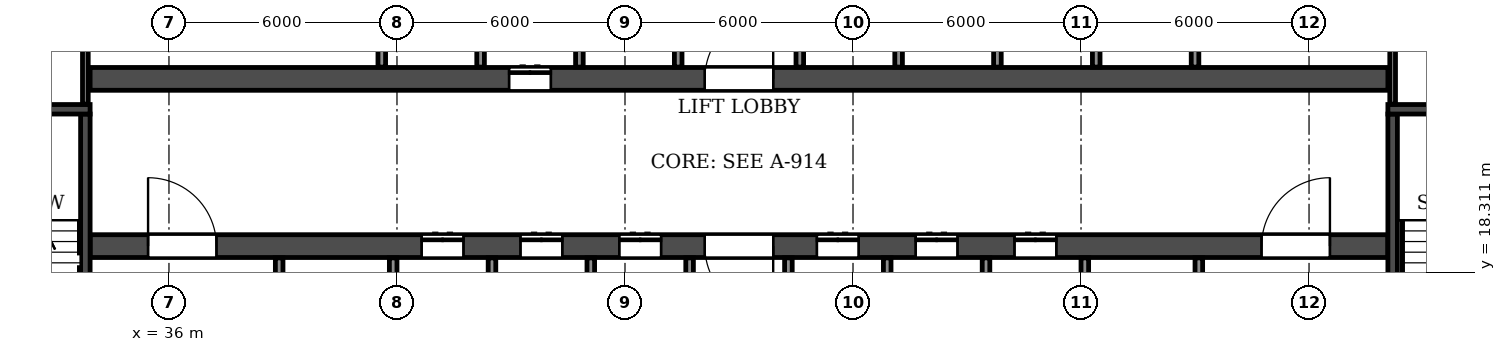
"""IFC4 building model, lengths in metres.
Left out: names, types, materials, properties, quantities, classifications, styles, units other than length and angle.
Written with IfcOpenShell. Run it as: python <this file> out.ifc"""

import sys

from ifc_helpers import new_model, si_unit, direction, frame, frame_2d, origin, place, context, subcontext, project, spatial, rectangle, extrude, element, fill, save


model = new_model("IFC4")
c1 = context("Model", 3, precision=1e-05, world=origin(), true_north=direction((0.0, 1.0)))
c2 = subcontext(c1, "Body", "Model", "MODEL_VIEW")
j1 = project(units=[si_unit("LENGTHUNIT", "METRE"), si_unit("PLANEANGLEUNIT", "RADIAN")], contexts=[c1])
p1 = place(None, origin())
s1 = spatial("IfcSite", under=j1, at=p1, CompositionType="ELEMENT")
p2 = place(p1, origin())
s2 = spatial("IfcBuilding", under=s1, at=p2, CompositionType="ELEMENT")
p3 = place(p2, frame((0.0, 0.0, 66.3)))
s3 = spatial("IfcBuildingStorey", under=s2, at=p3, CompositionType="ELEMENT", Elevation=66.3)
p4 = place(p3, frame((33.925, 19.0, 0.0), z_axis=(0.0, 0.0, 1.0), x_axis=(1.0, 0.0, 0.0)))
e1 = element("IfcWall", 1, at=p4, inside=s3, PredefinedType="SOLIDWALL", context=c2, shape_type="SweptSolid", body=[
    extrude(rectangle(XDim=34.15, YDim=0.6, at=frame_2d((17.075, 0.0))), origin(), (0.0, 0.0, 1.0), 6.36),
])
p5 = place(p4, frame((16.175, 0.0, 0.0)))
e2 = element("IfcOpeningElement", 2, at=p5, cuts=e1, PredefinedType="OPENING", context=c2, shape_type="SweptSolid", body=[
    extrude(rectangle(XDim=1.8, YDim=2.1, at=frame_2d((0.9, 1.05))), frame((0.0, 0.31, 0.0), z_axis=(0.0, -1.0, 0.0), x_axis=(1.0, 0.0, 0.0)), (0.0, 0.0, 1.0), 0.62),
])
p6 = place(p4, frame((1.525, 0.0, 0.0)))
e3 = element("IfcOpeningElement", 3, at=p6, cuts=e1, PredefinedType="OPENING", context=c2, shape_type="SweptSolid", body=[
    extrude(rectangle(XDim=1.8, YDim=2.1, at=frame_2d((0.9, 1.05))), frame((0.0, 0.31, 0.0), z_axis=(0.0, -1.0, 0.0), x_axis=(1.0, 0.0, 0.0)), (0.0, 0.0, 1.0), 0.62),
])
p7 = place(p4, frame((8.725, 0.0, 0.0)))
e4 = element("IfcOpeningElement", 4, at=p7, cuts=e1, PredefinedType="OPENING", context=c2, shape_type="SweptSolid", body=[
    extrude(rectangle(XDim=1.1, YDim=2.1, at=frame_2d((0.55, 1.05))), frame((0.0, 0.31, 0.0), z_axis=(0.0, -1.0, 0.0), x_axis=(1.0, 0.0, 0.0)), (0.0, 0.0, 1.0), 0.62),
])
p8 = place(p4, frame((11.325, 0.0, 0.0)))
e5 = element("IfcOpeningElement", 5, at=p8, cuts=e1, PredefinedType="OPENING", context=c2, shape_type="SweptSolid", body=[
    extrude(rectangle(XDim=1.1, YDim=2.1, at=frame_2d((0.55, 1.05))), frame((0.0, 0.31, 0.0), z_axis=(0.0, -1.0, 0.0), x_axis=(1.0, 0.0, 0.0)), (0.0, 0.0, 1.0), 0.62),
])
p9 = place(p4, frame((13.925, 0.0, 0.0)))
e6 = element("IfcOpeningElement", 6, at=p9, cuts=e1, PredefinedType="OPENING", context=c2, shape_type="SweptSolid", body=[
    extrude(rectangle(XDim=1.1, YDim=2.1, at=frame_2d((0.55, 1.05))), frame((0.0, 0.31, 0.0), z_axis=(0.0, -1.0, 0.0), x_axis=(1.0, 0.0, 0.0)), (0.0, 0.0, 1.0), 0.62),
])
p10 = place(p4, frame((19.125, 0.0, 0.0)))
e7 = element("IfcOpeningElement", 7, at=p10, cuts=e1, PredefinedType="OPENING", context=c2, shape_type="SweptSolid", body=[
    extrude(rectangle(XDim=1.1, YDim=2.1, at=frame_2d((0.55, 1.05))), frame((0.0, 0.31, 0.0), z_axis=(0.0, -1.0, 0.0), x_axis=(1.0, 0.0, 0.0)), (0.0, 0.0, 1.0), 0.62),
])
p11 = place(p4, frame((21.725, 0.0, 0.0)))
e8 = element("IfcOpeningElement", 8, at=p11, cuts=e1, PredefinedType="OPENING", context=c2, shape_type="SweptSolid", body=[
    extrude(rectangle(XDim=1.1, YDim=2.1, at=frame_2d((0.55, 1.05))), frame((0.0, 0.31, 0.0), z_axis=(0.0, -1.0, 0.0), x_axis=(1.0, 0.0, 0.0)), (0.0, 0.0, 1.0), 0.62),
])
p12 = place(p4, frame((24.325, 0.0, 0.0)))
e9 = element("IfcOpeningElement", 9, at=p12, cuts=e1, PredefinedType="OPENING", context=c2, shape_type="SweptSolid", body=[
    extrude(rectangle(XDim=1.1, YDim=2.1, at=frame_2d((0.55, 1.05))), frame((0.0, 0.31, 0.0), z_axis=(0.0, -1.0, 0.0), x_axis=(1.0, 0.0, 0.0)), (0.0, 0.0, 1.0), 0.62),
])
p13 = place(p4, frame((30.825, 0.0, 0.0)))
e10 = element("IfcOpeningElement", 10, at=p13, cuts=e1, PredefinedType="OPENING", context=c2, shape_type="SweptSolid", body=[
    extrude(rectangle(XDim=1.8, YDim=2.1, at=frame_2d((0.9, 1.05))), frame((0.0, 0.31, 0.0), z_axis=(0.0, -1.0, 0.0), x_axis=(1.0, 0.0, 0.0)), (0.0, 0.0, 1.0), 0.62),
])
p14 = place(p3, frame((33.925, 23.4, 0.0), z_axis=(0.0, 0.0, 1.0), x_axis=(1.0, 0.0, 0.0)))
e11 = element("IfcWall", 11, at=p14, inside=s3, PredefinedType="SOLIDWALL", context=c2, shape_type="SweptSolid", body=[
    extrude(rectangle(XDim=34.15, YDim=0.6, at=frame_2d((17.075, 0.0))), origin(), (0.0, 0.0, 1.0), 6.36),
])
p15 = place(p14, frame((16.175, 0.0, 0.0)))
e12 = element("IfcOpeningElement", 12, at=p15, cuts=e11, PredefinedType="OPENING", context=c2, shape_type="SweptSolid", body=[
    extrude(rectangle(XDim=1.8, YDim=2.1, at=frame_2d((0.9, 1.05))), frame((0.0, 0.31, 0.0), z_axis=(0.0, -1.0, 0.0), x_axis=(1.0, 0.0, 0.0)), (0.0, 0.0, 1.0), 0.62),
])
p16 = place(p14, frame((11.025, 0.0, 0.0)))
e13 = element("IfcOpeningElement", 13, at=p16, cuts=e11, PredefinedType="OPENING", context=c2, shape_type="SweptSolid", body=[
    extrude(rectangle(XDim=1.1, YDim=2.1, at=frame_2d((0.55, 1.05))), frame((0.0, 0.31, 0.0), z_axis=(0.0, -1.0, 0.0), x_axis=(1.0, 0.0, 0.0)), (0.0, 0.0, 1.0), 0.62),
])
p17 = place(p3, frame((33.8, 14.9, 0.0), z_axis=(0.0, 0.0, 1.0), x_axis=(0.0, 1.0, 0.0)))
e14 = element("IfcWall", 14, at=p17, inside=s3, PredefinedType="SOLIDWALL", context=c2, shape_type="SweptSolid", body=[
    extrude(rectangle(XDim=7.575, YDim=0.25, at=frame_2d((3.788, 0.0))), origin(), (0.0, 0.0, 1.0), 6.36),
])
p18 = place(p17, frame((0.4, 0.0, 0.0)))
e15 = element("IfcOpeningElement", 15, at=p18, cuts=e14, PredefinedType="OPENING", context=c2, shape_type="SweptSolid", body=[
    extrude(rectangle(XDim=1.0, YDim=2.1, at=frame_2d((0.5, 1.05))), frame((0.0, 0.135, 0.0), z_axis=(0.0, -1.0, 0.0), x_axis=(1.0, 0.0, 0.0)), (0.0, 0.0, 1.0), 0.27),
])
p19 = place(p3, frame((29.875, 22.6, 0.0), z_axis=(0.0, 0.0, 1.0), x_axis=(1.0, 0.0, 0.0)))
e16 = element("IfcWall", 16, at=p19, inside=s3, PredefinedType="SOLIDWALL", context=c2, shape_type="SweptSolid", body=[
    extrude(rectangle(XDim=4.05, YDim=0.25, at=frame_2d((2.025, 0.0))), origin(), (0.0, 0.0, 1.0), 6.36),
])
p20 = place(p3, frame((68.2, 14.9, 0.0), z_axis=(0.0, 0.0, 1.0), x_axis=(0.0, 1.0, 0.0)))
e17 = element("IfcWall", 17, at=p20, inside=s3, PredefinedType="SOLIDWALL", context=c2, shape_type="SweptSolid", body=[
    extrude(rectangle(XDim=7.575, YDim=0.25, at=frame_2d((3.788, 0.0))), origin(), (0.0, 0.0, 1.0), 6.36),
])
p21 = place(p20, frame((0.4, 0.0, 0.0)))
e18 = element("IfcOpeningElement", 18, at=p21, cuts=e17, PredefinedType="OPENING", context=c2, shape_type="SweptSolid", body=[
    extrude(rectangle(XDim=1.0, YDim=2.1, at=frame_2d((0.5, 1.05))), frame((0.0, 0.135, 0.0), z_axis=(0.0, -1.0, 0.0), x_axis=(1.0, 0.0, 0.0)), (0.0, 0.0, 1.0), 0.27),
])
p22 = place(p3, frame((68.075, 22.6, 0.0), z_axis=(0.0, 0.0, 1.0), x_axis=(1.0, 0.0, 0.0)))
e19 = element("IfcWall", 19, at=p22, inside=s3, PredefinedType="SOLIDWALL", context=c2, shape_type="SweptSolid", body=[
    extrude(rectangle(XDim=4.05, YDim=0.25, at=frame_2d((2.025, 0.0))), origin(), (0.0, 0.0, 1.0), 6.36),
])
for number, where, z_axis, x_axis in (
    (20, (41.6, 23.71, 0.0), (0.0, 0.0, 1.0), (0.0, 1.0, 0.0)),
    (21, (49.4, 23.71, 0.0), (0.0, 0.0, 1.0), (0.0, 1.0, 0.0)),
    (22, (63.0, 23.71, 0.0), (0.0, 0.0, 1.0), (0.0, 1.0, 0.0)),
):
    element("IfcWall", number, at=place(p3, frame(where, z_axis=z_axis, x_axis=x_axis)), inside=s3, PredefinedType="PARTITIONING", context=c2, shape_type="SweptSolid", body=[
        extrude(rectangle(XDim=3.78, YDim=0.2, at=frame_2d((1.89, 0.0))), origin(), (0.0, 0.0, 1.0), 6.36),
    ])
for number, where, z_axis, x_axis in (
    (23, (33.8, 22.735, 0.0), (0.0, 0.0, 1.0), (0.0, 1.0, 0.0)),
    (24, (68.2, 22.735, 0.0), (0.0, 0.0, 1.0), (0.0, 1.0, 0.0)),
):
    element("IfcWall", number, at=place(p3, frame(where, z_axis=z_axis, x_axis=x_axis)), inside=s3, PredefinedType="PARTITIONING", context=c2, shape_type="SweptSolid", body=[
        extrude(rectangle(XDim=4.755, YDim=0.15, at=frame_2d((2.377, 0.0))), origin(), (0.0, 0.0, 1.0), 6.36),
    ])
p23 = place(p3, frame((38.9, 14.91, 0.0), z_axis=(0.0, 0.0, 1.0), x_axis=(0.0, 1.0, 0.0)))
e25 = element("IfcWall", 25, at=p23, inside=s3, PredefinedType="PARTITIONING", context=c2, shape_type="SweptSolid", body=[
    extrude(rectangle(XDim=3.78, YDim=0.2, at=frame_2d((1.89, 0.0))), origin(), (0.0, 0.0, 1.0), 6.36),
])
p24 = place(p23, frame((1.34, 0.0, 0.0)))
e26 = element("IfcOpeningElement", 26, at=p24, cuts=e25, PredefinedType="OPENING", context=c2, shape_type="SweptSolid", body=[
    extrude(rectangle(XDim=1.1, YDim=2.1, at=frame_2d((0.55, 1.05))), frame((0.0, 0.11, 0.0), z_axis=(0.0, -1.0, 0.0), x_axis=(1.0, 0.0, 0.0)), (0.0, 0.0, 1.0), 0.22),
])
for number, where, z_axis, x_axis in (
    (27, (41.9, 14.91, 0.0), (0.0, 0.0, 1.0), (0.0, 1.0, 0.0)),
    (28, (44.2, 23.71, 0.0), (0.0, 0.0, 1.0), (0.0, 1.0, 0.0)),
):
    element("IfcWall", number, at=place(p3, frame(where, z_axis=z_axis, x_axis=x_axis)), inside=s3, PredefinedType="PARTITIONING", context=c2, shape_type="SweptSolid", body=[
        extrude(rectangle(XDim=3.78, YDim=0.2, at=frame_2d((1.89, 0.0))), origin(), (0.0, 0.0, 1.0), 6.36),
    ])
p25 = place(p3, frame((44.5, 16.3, 0.0), z_axis=(0.0, 0.0, 1.0), x_axis=(0.0, 1.0, 0.0)))
e29 = element("IfcWall", 29, at=p25, inside=s3, PredefinedType="PARTITIONING", context=c2, shape_type="SweptSolid", body=[
    extrude(rectangle(XDim=2.39, YDim=0.2, at=frame_2d((1.195, 0.0))), origin(), (0.0, 0.0, 1.0), 6.36),
])
p26 = place(p3, frame((46.8, 23.71, 0.0), z_axis=(0.0, 0.0, 1.0), x_axis=(0.0, 1.0, 0.0)))
e30 = element("IfcWall", 30, at=p26, inside=s3, PredefinedType="PARTITIONING", context=c2, shape_type="SweptSolid", body=[
    extrude(rectangle(XDim=3.78, YDim=0.2, at=frame_2d((1.89, 0.0))), origin(), (0.0, 0.0, 1.0), 6.36),
])
for number, where, z_axis, x_axis in (
    (31, (47.1, 16.3, 0.0), (0.0, 0.0, 1.0), (0.0, 1.0, 0.0)),
    (32, (49.7, 16.3, 0.0), (0.0, 0.0, 1.0), (0.0, 1.0, 0.0)),
    (33, (52.3, 16.3, 0.0), (0.0, 0.0, 1.0), (0.0, 1.0, 0.0)),
):
    element("IfcWall", number, at=place(p3, frame(where, z_axis=z_axis, x_axis=x_axis)), inside=s3, PredefinedType="PARTITIONING", context=c2, shape_type="SweptSolid", body=[
        extrude(rectangle(XDim=2.39, YDim=0.2, at=frame_2d((1.195, 0.0))), origin(), (0.0, 0.0, 1.0), 6.36),
    ])
p27 = place(p3, frame((52.6, 23.71, 0.0), z_axis=(0.0, 0.0, 1.0), x_axis=(0.0, 1.0, 0.0)))
e34 = element("IfcWall", 34, at=p27, inside=s3, PredefinedType="PARTITIONING", context=c2, shape_type="SweptSolid", body=[
    extrude(rectangle(XDim=2.39, YDim=0.2, at=frame_2d((1.195, 0.0))), origin(), (0.0, 0.0, 1.0), 6.36),
])
p28 = place(p3, frame((54.9, 16.3, 0.0), z_axis=(0.0, 0.0, 1.0), x_axis=(0.0, 1.0, 0.0)))
e35 = element("IfcWall", 35, at=p28, inside=s3, PredefinedType="PARTITIONING", context=c2, shape_type="SweptSolid", body=[
    extrude(rectangle(XDim=2.39, YDim=0.2, at=frame_2d((1.195, 0.0))), origin(), (0.0, 0.0, 1.0), 6.36),
])
p29 = place(p3, frame((55.2, 23.71, 0.0), z_axis=(0.0, 0.0, 1.0), x_axis=(0.0, 1.0, 0.0)))
e36 = element("IfcWall", 36, at=p29, inside=s3, PredefinedType="PARTITIONING", context=c2, shape_type="SweptSolid", body=[
    extrude(rectangle(XDim=2.39, YDim=0.2, at=frame_2d((1.195, 0.0))), origin(), (0.0, 0.0, 1.0), 6.36),
])
p30 = place(p3, frame((57.5, 16.3, 0.0), z_axis=(0.0, 0.0, 1.0), x_axis=(0.0, 1.0, 0.0)))
e37 = element("IfcWall", 37, at=p30, inside=s3, PredefinedType="PARTITIONING", context=c2, shape_type="SweptSolid", body=[
    extrude(rectangle(XDim=2.39, YDim=0.2, at=frame_2d((1.195, 0.0))), origin(), (0.0, 0.0, 1.0), 6.36),
])
p31 = place(p3, frame((57.8, 23.71, 0.0), z_axis=(0.0, 0.0, 1.0), x_axis=(0.0, 1.0, 0.0)))
e38 = element("IfcWall", 38, at=p31, inside=s3, PredefinedType="PARTITIONING", context=c2, shape_type="SweptSolid", body=[
    extrude(rectangle(XDim=2.39, YDim=0.2, at=frame_2d((1.195, 0.0))), origin(), (0.0, 0.0, 1.0), 6.36),
])
p32 = place(p3, frame((60.1, 14.91, 0.0), z_axis=(0.0, 0.0, 1.0), x_axis=(0.0, 1.0, 0.0)))
e39 = element("IfcWall", 39, at=p32, inside=s3, PredefinedType="PARTITIONING", context=c2, shape_type="SweptSolid", body=[
    extrude(rectangle(XDim=3.78, YDim=0.2, at=frame_2d((1.89, 0.0))), origin(), (0.0, 0.0, 1.0), 6.36),
])
p33 = place(p3, frame((60.4, 23.71, 0.0), z_axis=(0.0, 0.0, 1.0), x_axis=(0.0, 1.0, 0.0)))
e40 = element("IfcWall", 40, at=p33, inside=s3, PredefinedType="PARTITIONING", context=c2, shape_type="SweptSolid", body=[
    extrude(rectangle(XDim=2.39, YDim=0.2, at=frame_2d((1.195, 0.0))), origin(), (0.0, 0.0, 1.0), 6.36),
])
p34 = place(p3, frame((63.1, 14.91, 0.0), z_axis=(0.0, 0.0, 1.0), x_axis=(0.0, 1.0, 0.0)))
e41 = element("IfcWall", 41, at=p34, inside=s3, PredefinedType="PARTITIONING", context=c2, shape_type="SweptSolid", body=[
    extrude(rectangle(XDim=3.78, YDim=0.2, at=frame_2d((1.89, 0.0))), origin(), (0.0, 0.0, 1.0), 6.36),
])
p35 = place(p34, frame((1.34, 0.0, 0.0)))
e42 = element("IfcOpeningElement", 42, at=p35, cuts=e41, PredefinedType="OPENING", context=c2, shape_type="SweptSolid", body=[
    extrude(rectangle(XDim=1.1, YDim=2.1, at=frame_2d((0.55, 1.05))), frame((0.0, 0.11, 0.0), z_axis=(0.0, -1.0, 0.0), x_axis=(1.0, 0.0, 0.0)), (0.0, 0.0, 1.0), 0.22),
])
p36 = place(p15, origin())
e43 = element("IfcDoor", 43, at=p36, inside=s3, OperationType="DOUBLE_DOOR_SINGLE_SWING", PredefinedType="DOOR", context=c2, shape_type="SweptSolid", body=[
    extrude(rectangle(XDim=1.8, YDim=2.1, at=frame_2d((0.9, 1.05))), frame((0.0, 0.025, 0.0), z_axis=(0.0, -1.0, 0.0), x_axis=(1.0, 0.0, 0.0)), (0.0, 0.0, 1.0), 0.05),
])
fill(e12, e43)
p37 = place(p5, frame((1.8, 0.0, 0.0), z_axis=(0.0, 0.0, 1.0), x_axis=(-1.0, 0.0, 0.0)))
e44 = element("IfcDoor", 44, at=p37, inside=s3, OperationType="DOUBLE_DOOR_SINGLE_SWING", PredefinedType="DOOR", context=c2, shape_type="SweptSolid", body=[
    extrude(rectangle(XDim=1.8, YDim=2.1, at=frame_2d((0.9, 1.05))), frame((0.0, 0.025, 0.0), z_axis=(0.0, -1.0, 0.0), x_axis=(1.0, 0.0, 0.0)), (0.0, 0.0, 1.0), 0.05),
])
fill(e2, e44)
p38 = place(p6, origin())
e45 = element("IfcDoor", 45, at=p38, inside=s3, OperationType="DOUBLE_DOOR_SINGLE_SWING", PredefinedType="DOOR", context=c2, shape_type="SweptSolid", body=[
    extrude(rectangle(XDim=1.8, YDim=2.1, at=frame_2d((0.9, 1.05))), frame((0.0, 0.025, 0.0), z_axis=(0.0, -1.0, 0.0), x_axis=(1.0, 0.0, 0.0)), (0.0, 0.0, 1.0), 0.05),
])
fill(e3, e45)
p39 = place(p7, origin())
e46 = element("IfcDoor", 46, at=p39, inside=s3, OperationType="DOUBLE_DOOR_SLIDING", PredefinedType="DOOR", context=c2, shape_type="SweptSolid", body=[
    extrude(rectangle(XDim=1.1, YDim=2.1, at=frame_2d((0.55, 1.05))), frame((0.0, 0.025, 0.0), z_axis=(0.0, -1.0, 0.0), x_axis=(1.0, 0.0, 0.0)), (0.0, 0.0, 1.0), 0.05),
])
fill(e4, e46)
p40 = place(p16, origin())
e47 = element("IfcDoor", 47, at=p40, inside=s3, OperationType="DOUBLE_DOOR_SLIDING", PredefinedType="DOOR", context=c2, shape_type="SweptSolid", body=[
    extrude(rectangle(XDim=1.1, YDim=2.1, at=frame_2d((0.55, 1.05))), frame((0.0, 0.025, 0.0), z_axis=(0.0, -1.0, 0.0), x_axis=(1.0, 0.0, 0.0)), (0.0, 0.0, 1.0), 0.05),
])
fill(e13, e47)
p41 = place(p8, origin())
e48 = element("IfcDoor", 48, at=p41, inside=s3, OperationType="DOUBLE_DOOR_SLIDING", PredefinedType="DOOR", context=c2, shape_type="SweptSolid", body=[
    extrude(rectangle(XDim=1.1, YDim=2.1, at=frame_2d((0.55, 1.05))), frame((0.0, 0.025, 0.0), z_axis=(0.0, -1.0, 0.0), x_axis=(1.0, 0.0, 0.0)), (0.0, 0.0, 1.0), 0.05),
])
fill(e5, e48)
p42 = place(p9, origin())
e49 = element("IfcDoor", 49, at=p42, inside=s3, OperationType="DOUBLE_DOOR_SLIDING", PredefinedType="DOOR", context=c2, shape_type="SweptSolid", body=[
    extrude(rectangle(XDim=1.1, YDim=2.1, at=frame_2d((0.55, 1.05))), frame((0.0, 0.025, 0.0), z_axis=(0.0, -1.0, 0.0), x_axis=(1.0, 0.0, 0.0)), (0.0, 0.0, 1.0), 0.05),
])
fill(e6, e49)
p43 = place(p10, origin())
e50 = element("IfcDoor", 50, at=p43, inside=s3, OperationType="DOUBLE_DOOR_SLIDING", PredefinedType="DOOR", context=c2, shape_type="SweptSolid", body=[
    extrude(rectangle(XDim=1.1, YDim=2.1, at=frame_2d((0.55, 1.05))), frame((0.0, 0.025, 0.0), z_axis=(0.0, -1.0, 0.0), x_axis=(1.0, 0.0, 0.0)), (0.0, 0.0, 1.0), 0.05),
])
fill(e7, e50)
p44 = place(p11, origin())
e51 = element("IfcDoor", 51, at=p44, inside=s3, OperationType="DOUBLE_DOOR_SLIDING", PredefinedType="DOOR", context=c2, shape_type="SweptSolid", body=[
    extrude(rectangle(XDim=1.1, YDim=2.1, at=frame_2d((0.55, 1.05))), frame((0.0, 0.025, 0.0), z_axis=(0.0, -1.0, 0.0), x_axis=(1.0, 0.0, 0.0)), (0.0, 0.0, 1.0), 0.05),
])
fill(e8, e51)
p45 = place(p12, origin())
e52 = element("IfcDoor", 52, at=p45, inside=s3, OperationType="DOUBLE_DOOR_SLIDING", PredefinedType="DOOR", context=c2, shape_type="SweptSolid", body=[
    extrude(rectangle(XDim=1.1, YDim=2.1, at=frame_2d((0.55, 1.05))), frame((0.0, 0.025, 0.0), z_axis=(0.0, -1.0, 0.0), x_axis=(1.0, 0.0, 0.0)), (0.0, 0.0, 1.0), 0.05),
])
fill(e9, e52)
p46 = place(p13, origin())
e53 = element("IfcDoor", 53, at=p46, inside=s3, OperationType="DOUBLE_DOOR_SINGLE_SWING", PredefinedType="DOOR", context=c2, shape_type="SweptSolid", body=[
    extrude(rectangle(XDim=1.8, YDim=2.1, at=frame_2d((0.9, 1.05))), frame((0.0, 0.025, 0.0), z_axis=(0.0, -1.0, 0.0), x_axis=(1.0, 0.0, 0.0)), (0.0, 0.0, 1.0), 0.05),
])
fill(e10, e53)
save(model, sys.argv[1])
